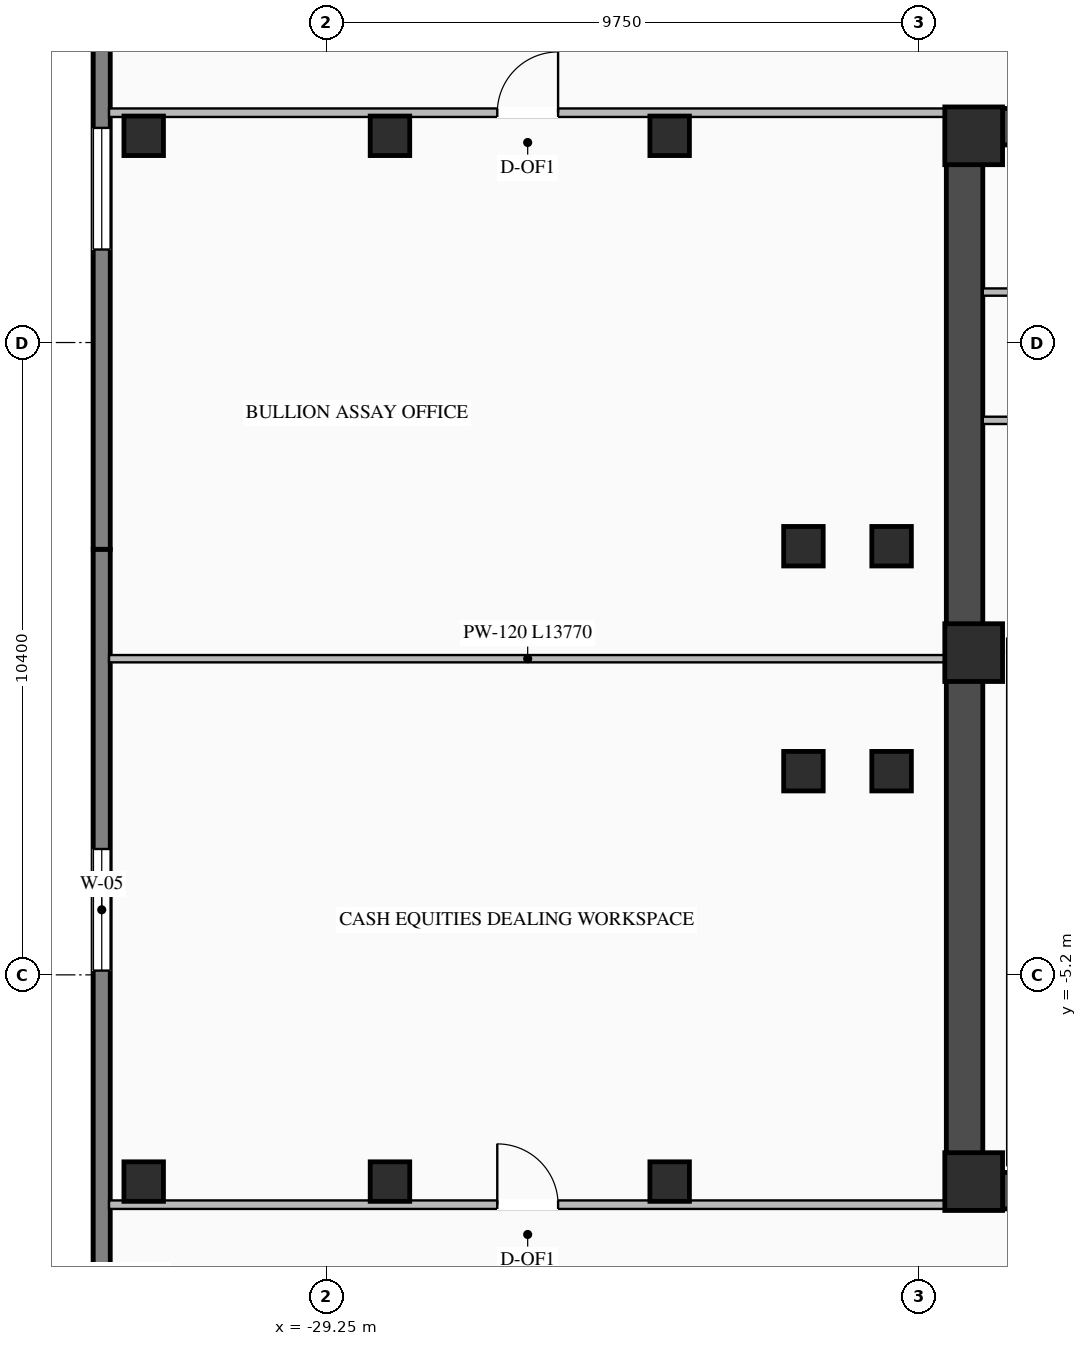
"""IFC4 building model, lengths in metres.
Left out: names, types, materials, properties, quantities, classifications, styles, units other than length and angle.
Written with IfcOpenShell. Run it as: python <this file> out.ifc"""

import sys

from ifc_helpers import new_model, si_unit, direction, frame, frame_2d, origin, origin_2d, place, context, subcontext, project, spatial, rectangle, i_section, extrude, element, fill, save


model = new_model("IFC4")
c1 = context("Model", 3, precision=1e-05, world=origin(), true_north=direction((0.0, 1.0)))
c2 = subcontext(c1, "Body", "Model", "MODEL_VIEW")
j1 = project(units=[si_unit("LENGTHUNIT", "METRE"), si_unit("PLANEANGLEUNIT", "RADIAN")], contexts=[c1])
p1 = place(None, origin())
s1 = spatial("IfcSite", under=j1, at=p1, CompositionType="ELEMENT")
p2 = place(p1, origin())
s2 = spatial("IfcBuilding", under=s1, at=p2, CompositionType="ELEMENT")
p3 = place(p2, frame((0.0, 0.0, 116.65)))
s3 = spatial("IfcBuildingStorey", under=s2, at=p3, CompositionType="ELEMENT", Elevation=116.65)
p4 = place(p3, frame((-19.05, -8.75, 0.0), z_axis=(0.0, 0.0, 1.0), x_axis=(1.0, 0.0, 0.0)))
e1 = element("IfcWall", 1, at=p4, inside=s3, PredefinedType="SHEAR", context=c2, shape_type="SweptSolid", body=[
    extrude(rectangle(XDim=10.25, YDim=0.6, at=frame_2d((5.125, 0.0))), origin(), (0.0, 0.0, 1.0), 4.02),
])
p5 = place(p3, frame((-19.05, 8.75, 0.0), z_axis=(0.0, 0.0, 1.0), x_axis=(1.0, 0.0, 0.0)))
e2 = element("IfcWall", 2, at=p5, inside=s3, PredefinedType="SHEAR", context=c2, shape_type="SweptSolid", body=[
    extrude(rectangle(XDim=10.25, YDim=0.6, at=frame_2d((5.125, 0.0))), origin(), (0.0, 0.0, 1.0), 4.02),
])
p6 = place(p5, frame((5.6, 0.0, 0.0)))
e3 = element("IfcOpeningElement", 3, at=p6, cuts=e2, PredefinedType="OPENING", context=c2, shape_type="SweptSolid", body=[
    extrude(rectangle(XDim=1.4, YDim=2.05, at=frame_2d((0.7, 1.025))), frame((0.0, 0.31, 0.0), z_axis=(0.0, -1.0, 0.0), x_axis=(1.0, 0.0, 0.0)), (0.0, 0.0, 1.0), 0.62),
])
p7 = place(p3, frame((-18.75, -8.45, 0.0), z_axis=(0.0, 0.0, 1.0), x_axis=(0.0, 1.0, 0.0)))
e4 = element("IfcWall", 4, at=p7, inside=s3, PredefinedType="SHEAR", context=c2, shape_type="SweptSolid", body=[
    extrude(rectangle(XDim=16.9, YDim=0.6, at=frame_2d((8.45, 0.0))), origin(), (0.0, 0.0, 1.0), 4.02),
])
for number, where, z_axis, x_axis in (
    (5, (-18.6, -8.6, 0.0), (0.0, 0.0, 1.0), (1.0, 0.0, 0.0)),
    (6, (-18.6, 0.1, 0.0), (0.0, 0.0, 1.0), (1.0, 0.0, 0.0)),
    (7, (-18.6, 8.6, 0.0), (0.0, 0.0, 1.0), (1.0, 0.0, 0.0)),
):
    element("IfcColumn", number, at=place(p3, frame(where, z_axis=z_axis, x_axis=x_axis)), inside=s3, PredefinedType="COLUMN", context=c2, shape_type="SweptSolid", body=[
        extrude(rectangle(XDim=0.95, YDim=0.95, at=origin_2d()), origin(), (0.0, 0.0, 1.0), 4.2),
    ])
for number, where, z_axis, x_axis in (
    (8, (-21.4, -1.85, 0.0), (0.0, 0.0, 1.0), (1.0, 0.0, 0.0)),
    (9, (-21.4, 1.85, 0.0), (0.0, 0.0, 1.0), (1.0, 0.0, 0.0)),
    (10, (-19.95, -1.85, 0.0), (0.0, 0.0, 1.0), (1.0, 0.0, 0.0)),
    (11, (-19.95, 1.85, 0.0), (0.0, 0.0, 1.0), (1.0, 0.0, 0.0)),
    (12, (-23.6, -8.6, 0.0), (0.0, 0.0, 1.0), (1.0, 0.0, 0.0)),
    (13, (-23.6, 8.6, 0.0), (0.0, 0.0, 1.0), (1.0, 0.0, 0.0)),
    (14, (-28.2, -8.6, 0.0), (0.0, 0.0, 1.0), (1.0, 0.0, 0.0)),
    (15, (-28.2, 8.6, 0.0), (0.0, 0.0, 1.0), (1.0, 0.0, 0.0)),
):
    element("IfcColumn", number, at=place(p3, frame(where, z_axis=z_axis, x_axis=x_axis)), inside=s3, PredefinedType="COLUMN", context=c2, shape_type="SweptSolid", body=[
        extrude(i_section(OverallWidth=0.65, OverallDepth=0.65, WebThickness=0.028, FlangeThickness=0.04, at=origin_2d()), origin(), (0.0, 0.0, 1.0), 4.2),
    ])
for number, where, z_axis, x_axis in (
    (16, (-32.25, -8.6, -0.28), (0.0, 0.0, 1.0), (1.0, 0.0, 0.0)),
    (17, (-32.25, 8.6, -0.28), (0.0, 0.0, 1.0), (1.0, 0.0, 0.0)),
):
    element("IfcColumn", number, at=place(p3, frame(where, z_axis=z_axis, x_axis=x_axis)), inside=s3, PredefinedType="COLUMN", context=c2, shape_type="SweptSolid", body=[
        extrude(i_section(OverallWidth=0.65, OverallDepth=0.65, WebThickness=0.028, FlangeThickness=0.04, at=origin_2d()), origin(), (0.0, 0.0, 1.0), 4.48),
    ])
p8 = place(p3, frame((-32.94, -15.99, 0.0), z_axis=(0.0, 0.0, 1.0), x_axis=(0.0, 1.0, 0.0)))
e18 = element("IfcWall", 18, at=p8, inside=s3, PredefinedType="STANDARD", context=c2, shape_type="SweptSolid", body=[
    extrude(rectangle(XDim=17.79, YDim=0.28, at=frame_2d((8.895, 0.0))), origin(), (0.0, 0.0, 1.0), 4.0),
])
p9 = place(p8, frame((10.86, 0.0, 0.76)))
e19 = element("IfcOpeningElement", 19, at=p9, cuts=e18, PredefinedType="OPENING", context=c2, shape_type="SweptSolid", body=[
    extrude(rectangle(XDim=2.0, YDim=2.05, at=frame_2d((1.0, 1.025))), frame((0.0, 0.15, 0.0), z_axis=(0.0, -1.0, 0.0), x_axis=(1.0, 0.0, 0.0)), (0.0, 0.0, 1.0), 0.3),
])
p10 = place(p3, frame((-32.94, 1.8, 0.0), z_axis=(0.0, 0.0, 1.0), x_axis=(0.0, 1.0, 0.0)))
e20 = element("IfcWall", 20, at=p10, inside=s3, PredefinedType="STANDARD", context=c2, shape_type="SweptSolid", body=[
    extrude(rectangle(XDim=17.79, YDim=0.28, at=frame_2d((8.895, 0.0))), origin(), (0.0, 0.0, 1.0), 4.0),
])
p11 = place(p10, frame((4.93, 0.0, 0.76)))
e21 = element("IfcOpeningElement", 21, at=p11, cuts=e20, PredefinedType="OPENING", context=c2, shape_type="SweptSolid", body=[
    extrude(rectangle(XDim=2.0, YDim=2.05, at=frame_2d((1.0, 1.025))), frame((0.0, 0.15, 0.0), z_axis=(0.0, -1.0, 0.0), x_axis=(1.0, 0.0, 0.0)), (0.0, 0.0, 1.0), 0.3),
])
p12 = place(p10, frame((10.86, 0.0, 0.76)))
e22 = element("IfcOpeningElement", 22, at=p12, cuts=e20, PredefinedType="OPENING", context=c2, shape_type="SweptSolid", body=[
    extrude(rectangle(XDim=2.0, YDim=2.05, at=frame_2d((1.0, 1.025))), frame((0.0, 0.15, 0.0), z_axis=(0.0, -1.0, 0.0), x_axis=(1.0, 0.0, 0.0)), (0.0, 0.0, 1.0), 0.3),
])
p13 = place(p3, frame((-18.45, 3.92, 0.0), z_axis=(0.0, 0.0, 1.0), x_axis=(1.0, 0.0, 0.0)))
e23 = element("IfcWall", 23, at=p13, inside=s3, PredefinedType="STANDARD", context=c2, shape_type="SweptSolid", body=[
    extrude(rectangle(XDim=4.55, YDim=0.12, at=frame_2d((2.275, 0.0))), origin(), (0.0, 0.0, 1.0), 4.0),
])
p14 = place(p3, frame((-18.45, 6.03, 0.0), z_axis=(0.0, 0.0, 1.0), x_axis=(1.0, 0.0, 0.0)))
e24 = element("IfcWall", 24, at=p14, inside=s3, PredefinedType="STANDARD", context=c2, shape_type="SweptSolid", body=[
    extrude(rectangle(XDim=2.3, YDim=0.12, at=frame_2d((1.15, 0.0))), origin(), (0.0, 0.0, 1.0), 4.0),
])
p15 = place(p3, frame((-32.82, 8.98, 0.0), z_axis=(0.0, 0.0, 1.0), x_axis=(1.0, 0.0, 0.0)))
e25 = element("IfcWall", 25, at=p15, inside=s3, PredefinedType="STANDARD", context=c2, shape_type="SweptSolid", body=[
    extrude(rectangle(XDim=13.77, YDim=0.14, at=frame_2d((6.885, 0.0))), origin(), (0.0, 0.0, 1.0), 4.0),
])
p16 = place(p15, frame((6.385, 0.0, 0.0)))
e26 = element("IfcOpeningElement", 26, at=p16, cuts=e25, PredefinedType="OPENING", context=c2, shape_type="SweptSolid", body=[
    extrude(rectangle(XDim=1.0, YDim=2.08, at=frame_2d((0.5, 1.04))), frame((0.0, 0.08, 0.0), z_axis=(0.0, -1.0, 0.0), x_axis=(1.0, 0.0, 0.0)), (0.0, 0.0, 1.0), 0.16),
])
p17 = place(p3, frame((-32.82, -8.98, 0.0), z_axis=(0.0, 0.0, 1.0), x_axis=(1.0, 0.0, 0.0)))
e27 = element("IfcWall", 27, at=p17, inside=s3, PredefinedType="STANDARD", context=c2, shape_type="SweptSolid", body=[
    extrude(rectangle(XDim=13.77, YDim=0.14, at=frame_2d((6.885, 0.0))), origin(), (0.0, 0.0, 1.0), 4.0),
])
p18 = place(p17, frame((6.385, 0.0, 0.0)))
e28 = element("IfcOpeningElement", 28, at=p18, cuts=e27, PredefinedType="OPENING", context=c2, shape_type="SweptSolid", body=[
    extrude(rectangle(XDim=1.0, YDim=2.08, at=frame_2d((0.5, 1.04))), frame((0.0, 0.08, 0.0), z_axis=(0.0, -1.0, 0.0), x_axis=(1.0, 0.0, 0.0)), (0.0, 0.0, 1.0), 0.16),
])
p19 = place(p3, frame((-32.82, 0.0, 0.0), z_axis=(0.0, 0.0, 1.0), x_axis=(1.0, 0.0, 0.0)))
e29 = element("IfcWall", 29, at=p19, inside=s3, PredefinedType="STANDARD", context=c2, shape_type="SweptSolid", body=[
    extrude(rectangle(XDim=13.77, YDim=0.12, at=frame_2d((6.885, 0.0))), origin(), (0.0, 0.0, 1.0), 3.545),
])
p20 = place(p9, origin())
e30 = element("IfcWindow", 30, at=p20, inside=s3, PartitioningType="DOUBLE_PANEL_VERTICAL", PredefinedType="WINDOW", context=c2, shape_type="SweptSolid", body=[
    extrude(rectangle(XDim=2.0, YDim=2.05, at=frame_2d((1.0, 1.025))), frame((0.0, 0.03, 0.0), z_axis=(0.0, -1.0, 0.0), x_axis=(1.0, 0.0, 0.0)), (0.0, 0.0, 1.0), 0.06),
])
fill(e19, e30)
p21 = place(p11, origin())
e31 = element("IfcWindow", 31, at=p21, inside=s3, PartitioningType="DOUBLE_PANEL_VERTICAL", PredefinedType="WINDOW", context=c2, shape_type="SweptSolid", body=[
    extrude(rectangle(XDim=2.0, YDim=2.05, at=frame_2d((1.0, 1.025))), frame((0.0, 0.03, 0.0), z_axis=(0.0, -1.0, 0.0), x_axis=(1.0, 0.0, 0.0)), (0.0, 0.0, 1.0), 0.06),
])
fill(e21, e31)
p22 = place(p16, origin())
e32 = element("IfcDoor", 32, at=p22, inside=s3, OperationType="SINGLE_SWING_RIGHT", PredefinedType="DOOR", context=c2, shape_type="SweptSolid", body=[
    extrude(rectangle(XDim=1.0, YDim=2.08, at=frame_2d((0.5, 1.04))), frame((0.0, 0.025, 0.0), z_axis=(0.0, -1.0, 0.0), x_axis=(1.0, 0.0, 0.0)), (0.0, 0.0, 1.0), 0.05),
])
fill(e26, e32)
p23 = place(p18, origin())
e33 = element("IfcDoor", 33, at=p23, inside=s3, OperationType="SINGLE_SWING_LEFT", PredefinedType="DOOR", context=c2, shape_type="SweptSolid", body=[
    extrude(rectangle(XDim=1.0, YDim=2.08, at=frame_2d((0.5, 1.04))), frame((0.0, 0.025, 0.0), z_axis=(0.0, -1.0, 0.0), x_axis=(1.0, 0.0, 0.0)), (0.0, 0.0, 1.0), 0.05),
])
fill(e28, e33)
save(model, sys.argv[1])
